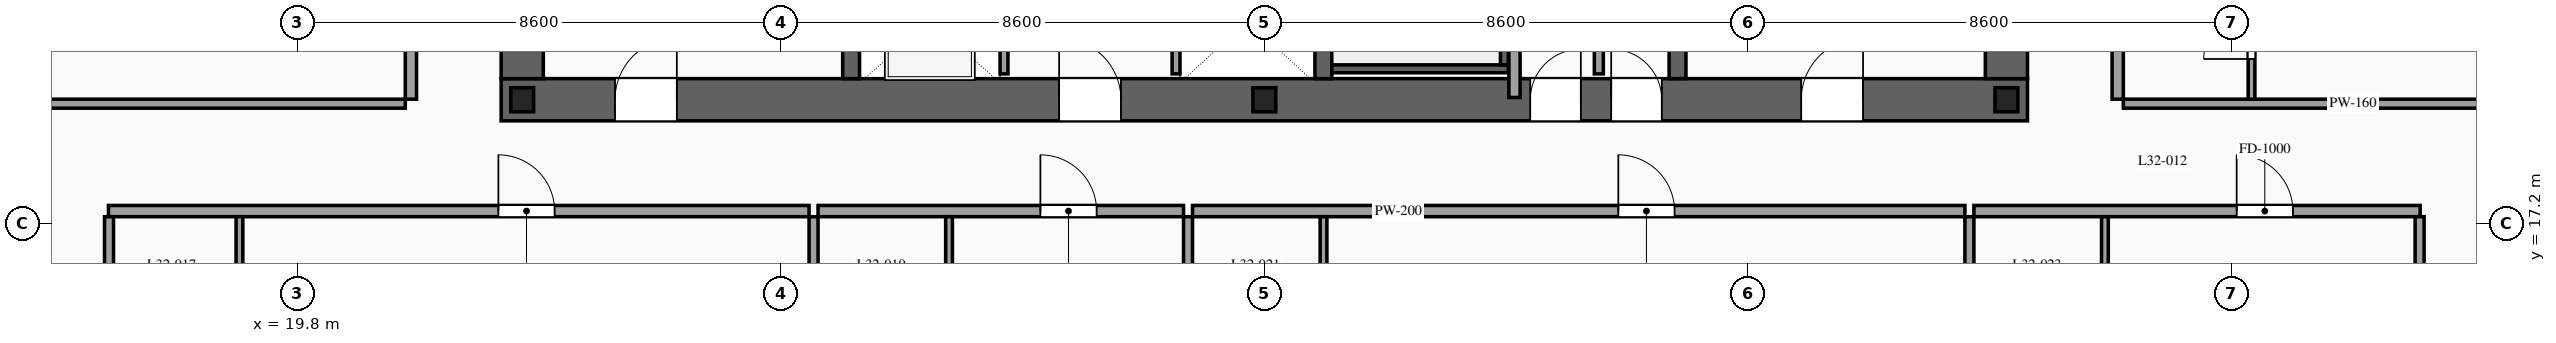
"""IFC4 building model, lengths in metres.
Left out: names, types, materials, properties, quantities, classifications, styles, units other than length and angle.
Written with IfcOpenShell. Run it as: python <this file> out.ifc"""

import sys

from ifc_helpers import new_model, si_unit, direction, frame, frame_2d, origin, origin_2d, place, context, subcontext, project, spatial, rectangle, i_section, extrude, source, transform, mapped, element, fill, save


model = new_model("IFC4")
c1 = context("Model", 3, precision=1e-05, world=origin(), true_north=direction((0.0, 1.0)))
c2 = subcontext(c1, "Body", "Model", "MODEL_VIEW")
j1 = project(units=[si_unit("LENGTHUNIT", "METRE"), si_unit("PLANEANGLEUNIT", "RADIAN")], contexts=[c1])
p1 = place(None, origin())
s1 = spatial("IfcSite", under=j1, at=p1, CompositionType="ELEMENT")
p2 = place(p1, origin())
s2 = spatial("IfcBuilding", under=s1, at=p2, CompositionType="ELEMENT")
p3 = place(p2, frame((0.0, 0.0, 122.6)))
s3 = spatial("IfcBuildingStorey", under=s2, at=p3, CompositionType="ELEMENT", Elevation=122.6)
p4 = place(p3, frame((23.425, 19.4, 0.0), z_axis=(0.0, 0.0, 1.0), x_axis=(1.0, 0.0, 0.0)))
e1 = element("IfcWall", 1, at=p4, inside=s3, PredefinedType="SHEAR", context=c2, shape_type="SweptSolid", body=[
    extrude(rectangle(XDim=27.15, YDim=0.75, at=frame_2d((13.575, 0.0))), origin(), (0.0, 0.0, 1.0), 3.6),
])
p5 = place(p4, frame((2.025, 0.0, 0.0)))
e2 = element("IfcOpeningElement", 2, at=p5, cuts=e1, PredefinedType="OPENING", context=c2, shape_type="SweptSolid", body=[
    extrude(rectangle(XDim=1.1, YDim=2.2, at=frame_2d((0.55, 1.1))), frame((0.0, 0.39, 0.0), z_axis=(0.0, -1.0, 0.0), x_axis=(1.0, 0.0, 0.0)), (0.0, 0.0, 1.0), 0.78),
])
p6 = place(p4, frame((9.925, 0.0, 0.0)))
e3 = element("IfcOpeningElement", 3, at=p6, cuts=e1, PredefinedType="OPENING", context=c2, shape_type="SweptSolid", body=[
    extrude(rectangle(XDim=1.1, YDim=2.2, at=frame_2d((0.55, 1.1))), frame((0.0, 0.39, 0.0), z_axis=(0.0, -1.0, 0.0), x_axis=(1.0, 0.0, 0.0)), (0.0, 0.0, 1.0), 0.78),
])
p7 = place(p4, frame((23.125, 0.0, 0.0)))
e4 = element("IfcOpeningElement", 4, at=p7, cuts=e1, PredefinedType="OPENING", context=c2, shape_type="SweptSolid", body=[
    extrude(rectangle(XDim=1.1, YDim=2.2, at=frame_2d((0.55, 1.1))), frame((0.0, 0.39, 0.0), z_axis=(0.0, -1.0, 0.0), x_axis=(1.0, 0.0, 0.0)), (0.0, 0.0, 1.0), 0.78),
])
p8 = place(p4, frame((19.745, 0.0, 0.0)))
e5 = element("IfcOpeningElement", 5, at=p8, cuts=e1, PredefinedType="OPENING", context=c2, shape_type="SweptSolid", body=[
    extrude(rectangle(XDim=0.9, YDim=2.15, at=frame_2d((0.45, 1.075))), frame((0.0, 0.39, 0.0), z_axis=(0.0, -1.0, 0.0), x_axis=(1.0, 0.0, 0.0)), (0.0, 0.0, 1.0), 0.78),
])
p9 = place(p4, frame((18.305, 0.0, 0.0)))
e6 = element("IfcOpeningElement", 6, at=p9, cuts=e1, PredefinedType="OPENING", context=c2, shape_type="SweptSolid", body=[
    extrude(rectangle(XDim=0.9, YDim=2.15, at=frame_2d((0.45, 1.075))), frame((0.0, 0.39, 0.0), z_axis=(0.0, -1.0, 0.0), x_axis=(1.0, 0.0, 0.0)), (0.0, 0.0, 1.0), 0.78),
])
m1 = source(origin(), c2, "Body", "SweptSolid", [
    extrude(rectangle(XDim=12.05, YDim=0.75, at=frame_2d((6.025, 0.0))), origin(), (0.0, 0.0, 1.0), 3.6),
])
for number, where, z_axis, x_axis in (
    (7, (23.8, 19.775, 0.0), (0.0, 0.0, 1.0), (0.0, 1.0, 0.0)),
    (8, (50.2, 19.775, 0.0), (0.0, 0.0, 1.0), (0.0, 1.0, 0.0)),
):
    element("IfcWall", number, at=place(p3, frame(where, z_axis=z_axis, x_axis=x_axis)), inside=s3, PredefinedType="SHEAR", context=c2, shape_type="MappedRepresentation", body=[
        mapped(m1, transform((0.0, 0.0, 0.0), scale=1.0)),
    ])
m2 = source(origin(), c2, "Body", "SweptSolid", [
    extrude(rectangle(XDim=12.05, YDim=0.3, at=frame_2d((6.025, 0.0))), origin(), (0.0, 0.0, 1.0), 3.6),
])
for number, where, z_axis, x_axis in (
    (9, (29.65, 19.775, 0.0), (0.0, 0.0, 1.0), (0.0, 1.0, 0.0)),
    (10, (38.05, 19.775, 0.0), (0.0, 0.0, 1.0), (0.0, 1.0, 0.0)),
    (11, (44.35, 19.775, 0.0), (0.0, 0.0, 1.0), (0.0, 1.0, 0.0)),
):
    element("IfcWall", number, at=place(p3, frame(where, z_axis=z_axis, x_axis=x_axis)), inside=s3, PredefinedType="SOLIDWALL", context=c2, shape_type="MappedRepresentation", body=[
        mapped(m2, transform((0.0, 0.0, 0.0), scale=1.0)),
    ])
m3 = source(origin(), c2, "Body", "SweptSolid", [
    extrude(i_section(OverallWidth=0.407, OverallDepth=0.428, WebThickness=0.02, FlangeThickness=0.035, at=origin_2d()), origin(), (0.0, 0.0, 1.0), 3.6),
])
for number, where, z_axis, x_axis in (
    (12, (23.8, 19.4, 0.0), (0.0, 0.0, 1.0), (1.0, 0.0, 0.0)),
    (13, (37.0, 19.4, 0.0), (0.0, 0.0, 1.0), (1.0, 0.0, 0.0)),
    (14, (50.2, 19.4, 0.0), (0.0, 0.0, 1.0), (1.0, 0.0, 0.0)),
):
    element("IfcColumn", number, at=place(p3, frame(where, z_axis=z_axis, x_axis=x_axis)), inside=s3, PredefinedType="COLUMN", context=c2, shape_type="MappedRepresentation", body=[
        mapped(m3, transform((0.0, 0.0, 0.0), scale=1.0)),
    ])
p10 = place(p3, frame((32.37, 19.86, 0.0), z_axis=(0.0, 0.0, 1.0), x_axis=(0.0, 1.0, 0.0)))
e15 = element("IfcWall", 15, at=p10, inside=s3, PredefinedType="SOLIDWALL", context=c2, shape_type="SweptSolid", body=[
    extrude(rectangle(XDim=2.04, YDim=0.14, at=frame_2d((1.02, 0.0))), origin(), (0.0, 0.0, 1.0), 3.38),
])
p11 = place(p10, frame((0.47, 0.0, 0.0)))
e16 = element("IfcOpeningElement", 16, at=p11, cuts=e15, PredefinedType="OPENING", context=c2, shape_type="SweptSolid", body=[
    extrude(rectangle(XDim=1.1, YDim=2.2, at=frame_2d((0.55, 1.1))), frame((0.0, 0.085, 0.0), z_axis=(0.0, -1.0, 0.0), x_axis=(1.0, 0.0, 0.0)), (0.0, 0.0, 1.0), 0.17),
])
m4 = source(origin(), c2, "Body", "SweptSolid", [
    extrude(rectangle(XDim=2.04, YDim=0.14, at=frame_2d((1.02, 0.0))), origin(), (0.0, 0.0, 1.0), 3.38),
])
p12 = place(p3, frame((35.43, 19.86, 0.0), z_axis=(0.0, 0.0, 1.0), x_axis=(0.0, 1.0, 0.0)))
e17 = element("IfcWall", 17, at=p12, inside=s3, PredefinedType="SOLIDWALL", context=c2, shape_type="MappedRepresentation", body=[
    mapped(m4, transform((0.0, 0.0, 0.0), scale=1.0)),
])
m5 = source(origin(), c2, "Body", "SweptSolid", [
    extrude(rectangle(XDim=3.14, YDim=0.14, at=frame_2d((1.57, 0.0))), origin(), (0.0, 0.0, 1.0), 3.38),
])
p13 = place(p3, frame((38.2, 19.95, 0.0), z_axis=(0.0, 0.0, 1.0), x_axis=(1.0, 0.0, 0.0)))
e18 = element("IfcWall", 18, at=p13, inside=s3, PredefinedType="SOLIDWALL", context=c2, shape_type="MappedRepresentation", body=[
    mapped(m5, transform((0.0, 0.0, 0.0), scale=1.0)),
])
m6 = source(origin(), c2, "Body", "SweptSolid", [
    extrude(rectangle(XDim=8.94, YDim=0.14, at=frame_2d((4.47, 0.0))), origin(), (0.0, 0.0, 1.0), 3.38),
])
p14 = place(p3, frame((41.27, 20.02, 0.0), z_axis=(0.0, 0.0, 1.0), x_axis=(0.0, 1.0, 0.0)))
e19 = element("IfcWall", 19, at=p14, inside=s3, PredefinedType="SOLIDWALL", context=c2, shape_type="MappedRepresentation", body=[
    mapped(m6, transform((0.0, 0.0, 0.0), scale=1.0)),
])
m7 = source(origin(), c2, "Body", "SweptSolid", [
    extrude(rectangle(XDim=1.34, YDim=0.16, at=frame_2d((0.67, 0.0))), origin(), (0.0, 0.0, 1.0), 3.38),
])
p15 = place(p3, frame((42.95, 19.86, 0.0), z_axis=(0.0, 0.0, 1.0), x_axis=(0.0, 1.0, 0.0)))
e20 = element("IfcWall", 20, at=p15, inside=s3, PredefinedType="PARTITIONING", context=c2, shape_type="MappedRepresentation", body=[
    mapped(m7, transform((0.0, 0.0, 0.0), scale=1.0)),
])
m8 = source(origin(), c2, "Body", "SweptSolid", [
    extrude(rectangle(XDim=12.72, YDim=0.2, at=frame_2d((6.36, 0.0))), origin(), (0.0, 0.0, 1.0), 3.38),
])
p16 = place(p3, frame((41.45, 19.44, 0.0), z_axis=(0.0, 0.0, 1.0), x_axis=(0.0, 1.0, 0.0)))
e21 = element("IfcWall", 21, at=p16, inside=s3, PredefinedType="PARTITIONING", context=c2, shape_type="MappedRepresentation", body=[
    mapped(m8, transform((0.0, 0.0, 0.0), scale=1.0)),
])
p17 = place(p3, frame((16.44, 17.42, 0.0), z_axis=(0.0, 0.0, 1.0), x_axis=(1.0, 0.0, 0.0)))
e22 = element("IfcWall", 22, at=p17, inside=s3, PredefinedType="PARTITIONING", context=c2, shape_type="SweptSolid", body=[
    extrude(rectangle(XDim=12.462, YDim=0.2, at=frame_2d((6.231, 0.0))), origin(), (0.0, 0.0, 1.0), 3.38),
])
p18 = place(p17, frame((6.936, 0.0, 0.0)))
e23 = element("IfcOpeningElement", 23, at=p18, cuts=e22, PredefinedType="OPENING", context=c2, shape_type="SweptSolid", body=[
    extrude(rectangle(XDim=1.0, YDim=2.2, at=frame_2d((0.5, 1.1))), frame((0.0, 0.115, 0.0), z_axis=(0.0, -1.0, 0.0), x_axis=(1.0, 0.0, 0.0)), (0.0, 0.0, 1.0), 0.23),
])
m9 = source(origin(), c2, "Body", "SweptSolid", [
    extrude(rectangle(XDim=14.97, YDim=0.16, at=frame_2d((7.485, 0.0))), origin(), (0.0, 0.0, 1.0), 3.38),
])
p19 = place(p3, frame((28.982, 2.35, 0.0), z_axis=(0.0, 0.0, 1.0), x_axis=(0.0, 1.0, 0.0)))
e24 = element("IfcWall", 24, at=p19, inside=s3, PredefinedType="PARTITIONING", context=c2, shape_type="MappedRepresentation", body=[
    mapped(m9, transform((0.0, 0.0, 0.0), scale=1.0)),
])
m10 = source(origin(), c2, "Body", "SweptSolid", [
    extrude(rectangle(XDim=2.42, YDim=0.12, at=frame_2d((1.21, 0.0))), origin(), (0.0, 0.0, 1.0), 3.38),
])
p20 = place(p3, frame((18.77, 14.9, 0.0), z_axis=(0.0, 0.0, 1.0), x_axis=(0.0, 1.0, 0.0)))
e25 = element("IfcWall", 25, at=p20, inside=s3, PredefinedType="PARTITIONING", context=c2, shape_type="MappedRepresentation", body=[
    mapped(m10, transform((0.0, 0.0, 0.0), scale=1.0)),
])
p21 = place(p3, frame((29.062, 17.42, 0.0), z_axis=(0.0, 0.0, 1.0), x_axis=(1.0, 0.0, 0.0)))
e26 = element("IfcWall", 26, at=p21, inside=s3, PredefinedType="PARTITIONING", context=c2, shape_type="SweptSolid", body=[
    extrude(rectangle(XDim=6.501, YDim=0.2, at=frame_2d((3.25, 0.0))), origin(), (0.0, 0.0, 1.0), 3.38),
])
p22 = place(p21, frame((3.955, 0.0, 0.0)))
e27 = element("IfcOpeningElement", 27, at=p22, cuts=e26, PredefinedType="OPENING", context=c2, shape_type="SweptSolid", body=[
    extrude(rectangle(XDim=1.0, YDim=2.2, at=frame_2d((0.5, 1.1))), frame((0.0, 0.115, 0.0), z_axis=(0.0, -1.0, 0.0), x_axis=(1.0, 0.0, 0.0)), (0.0, 0.0, 1.0), 0.23),
])
p23 = place(p3, frame((35.643, 2.35, 0.0), z_axis=(0.0, 0.0, 1.0), x_axis=(0.0, 1.0, 0.0)))
e28 = element("IfcWall", 28, at=p23, inside=s3, PredefinedType="PARTITIONING", context=c2, shape_type="MappedRepresentation", body=[
    mapped(m9, transform((0.0, 0.0, 0.0), scale=1.0)),
])
p24 = place(p3, frame((31.392, 14.9, 0.0), z_axis=(0.0, 0.0, 1.0), x_axis=(0.0, 1.0, 0.0)))
e29 = element("IfcWall", 29, at=p24, inside=s3, PredefinedType="PARTITIONING", context=c2, shape_type="MappedRepresentation", body=[
    mapped(m10, transform((0.0, 0.0, 0.0), scale=1.0)),
])
p25 = place(p3, frame((35.723, 17.42, 0.0), z_axis=(0.0, 0.0, 1.0), x_axis=(1.0, 0.0, 0.0)))
e30 = element("IfcWall", 30, at=p25, inside=s3, PredefinedType="PARTITIONING", context=c2, shape_type="SweptSolid", body=[
    extrude(rectangle(XDim=13.739, YDim=0.2, at=frame_2d((6.87, 0.0))), origin(), (0.0, 0.0, 1.0), 3.38),
])
p26 = place(p25, frame((7.574, 0.0, 0.0)))
e31 = element("IfcOpeningElement", 31, at=p26, cuts=e30, PredefinedType="OPENING", context=c2, shape_type="SweptSolid", body=[
    extrude(rectangle(XDim=1.0, YDim=2.2, at=frame_2d((0.5, 1.1))), frame((0.0, 0.115, 0.0), z_axis=(0.0, -1.0, 0.0), x_axis=(1.0, 0.0, 0.0)), (0.0, 0.0, 1.0), 0.23),
])
p27 = place(p3, frame((49.542, 2.35, 0.0), z_axis=(0.0, 0.0, 1.0), x_axis=(0.0, 1.0, 0.0)))
e32 = element("IfcWall", 32, at=p27, inside=s3, PredefinedType="PARTITIONING", context=c2, shape_type="MappedRepresentation", body=[
    mapped(m9, transform((0.0, 0.0, 0.0), scale=1.0)),
])
p28 = place(p3, frame((38.053, 14.9, 0.0), z_axis=(0.0, 0.0, 1.0), x_axis=(0.0, 1.0, 0.0)))
e33 = element("IfcWall", 33, at=p28, inside=s3, PredefinedType="PARTITIONING", context=c2, shape_type="MappedRepresentation", body=[
    mapped(m10, transform((0.0, 0.0, 0.0), scale=1.0)),
])
p29 = place(p3, frame((49.622, 17.42, 0.0), z_axis=(0.0, 0.0, 1.0), x_axis=(1.0, 0.0, 0.0)))
e34 = element("IfcWall", 34, at=p29, inside=s3, PredefinedType="PARTITIONING", context=c2, shape_type="SweptSolid", body=[
    extrude(rectangle(XDim=7.938, YDim=0.2, at=frame_2d((3.969, 0.0))), origin(), (0.0, 0.0, 1.0), 3.38),
])
p30 = place(p29, frame((4.674, 0.0, 0.0)))
e35 = element("IfcOpeningElement", 35, at=p30, cuts=e34, PredefinedType="OPENING", context=c2, shape_type="SweptSolid", body=[
    extrude(rectangle(XDim=1.0, YDim=2.2, at=frame_2d((0.5, 1.1))), frame((0.0, 0.115, 0.0), z_axis=(0.0, -1.0, 0.0), x_axis=(1.0, 0.0, 0.0)), (0.0, 0.0, 1.0), 0.23),
])
m11 = source(origin(), c2, "Body", "SweptSolid", [
    extrude(rectangle(XDim=14.82, YDim=0.16, at=frame_2d((7.41, 0.0))), origin(), (0.0, 0.0, 1.0), 3.38),
])
for number, where, z_axis, x_axis in (
    (36, (16.45, 2.5, 0.0), (0.0, 0.0, 1.0), (0.0, 1.0, 0.0)),
    (37, (57.55, 2.5, 0.0), (0.0, 0.0, 1.0), (0.0, 1.0, 0.0)),
):
    element("IfcWall", number, at=place(p3, frame(where, z_axis=z_axis, x_axis=x_axis)), inside=s3, PredefinedType="PARTITIONING", context=c2, shape_type="MappedRepresentation", body=[
        mapped(m11, transform((0.0, 0.0, 0.0), scale=1.0)),
    ])
p31 = place(p3, frame((51.952, 14.9, 0.0), z_axis=(0.0, 0.0, 1.0), x_axis=(0.0, 1.0, 0.0)))
e38 = element("IfcWall", 38, at=p31, inside=s3, PredefinedType="PARTITIONING", context=c2, shape_type="MappedRepresentation", body=[
    mapped(m10, transform((0.0, 0.0, 0.0), scale=1.0)),
])
p32 = place(p3, frame((21.82, 19.41, 0.0), z_axis=(0.0, 0.0, 1.0), x_axis=(0.0, 1.0, 0.0)))
e39 = element("IfcWall", 39, at=p32, inside=s3, PredefinedType="PARTITIONING", context=c2, shape_type="SweptSolid", body=[
    extrude(rectangle(XDim=12.78, YDim=0.2, at=frame_2d((6.39, 0.0))), origin(), (0.0, 0.0, 1.0), 3.38),
])
p33 = place(p32, frame((5.89, 0.0, 0.0)))
e40 = element("IfcOpeningElement", 40, at=p33, cuts=e39, PredefinedType="OPENING", context=c2, shape_type="SweptSolid", body=[
    extrude(rectangle(XDim=1.0, YDim=2.2, at=frame_2d((0.5, 1.1))), frame((0.0, 0.115, 0.0), z_axis=(0.0, -1.0, 0.0), x_axis=(1.0, 0.0, 0.0)), (0.0, 0.0, 1.0), 0.23),
])
m12 = source(origin(), c2, "Body", "SweptSolid", [
    extrude(rectangle(XDim=8.17, YDim=0.16, at=frame_2d((4.085, 0.0))), origin(), (0.0, 0.0, 1.0), 2.875),
])
p34 = place(p3, frame((13.55, 19.33, 0.0), z_axis=(0.0, 0.0, 1.0), x_axis=(1.0, 0.0, 0.0)))
e41 = element("IfcWall", 41, at=p34, inside=s3, PredefinedType="PARTITIONING", context=c2, shape_type="MappedRepresentation", body=[
    mapped(m12, transform((0.0, 0.0, 0.0), scale=1.0)),
])
p35 = place(p3, frame((52.18, 19.41, 0.0), z_axis=(0.0, 0.0, 1.0), x_axis=(0.0, 1.0, 0.0)))
e42 = element("IfcWall", 42, at=p35, inside=s3, PredefinedType="PARTITIONING", context=c2, shape_type="SweptSolid", body=[
    extrude(rectangle(XDim=6.31, YDim=0.2, at=frame_2d((3.155, 0.0))), origin(), (0.0, 0.0, 1.0), 3.38),
])
p36 = place(p35, frame((3.835, 0.0, 0.0)))
e43 = element("IfcOpeningElement", 43, at=p36, cuts=e42, PredefinedType="OPENING", context=c2, shape_type="SweptSolid", body=[
    extrude(rectangle(XDim=1.0, YDim=2.2, at=frame_2d((0.5, 1.1))), frame((0.0, 0.115, 0.0), z_axis=(0.0, -1.0, 0.0), x_axis=(1.0, 0.0, 0.0)), (0.0, 0.0, 1.0), 0.23),
])
p37 = place(p3, frame((52.28, 19.33, 0.0), z_axis=(0.0, 0.0, 1.0), x_axis=(1.0, 0.0, 0.0)))
e44 = element("IfcWall", 44, at=p37, inside=s3, PredefinedType="PARTITIONING", context=c2, shape_type="MappedRepresentation", body=[
    mapped(m12, transform((0.0, 0.0, 0.0), scale=1.0)),
])
p38 = place(p3, frame((54.56, 19.41, 0.0), z_axis=(0.0, 0.0, 1.0), x_axis=(0.0, 1.0, 0.0)))
e45 = element("IfcWall", 45, at=p38, inside=s3, PredefinedType="PARTITIONING", context=c2, shape_type="SweptSolid", body=[
    extrude(rectangle(XDim=2.28, YDim=0.12, at=frame_2d((1.14, 0.0))), origin(), (0.0, 0.0, 1.0), 3.38),
])
p39 = place(p38, frame((0.715, 0.0, 0.0)))
e46 = element("IfcOpeningElement", 46, at=p39, cuts=e45, PredefinedType="OPENING", context=c2, shape_type="SweptSolid", body=[
    extrude(rectangle(XDim=0.85, YDim=2.1, at=frame_2d((0.425, 1.05))), frame((0.0, 0.075, 0.0), z_axis=(0.0, -1.0, 0.0), x_axis=(1.0, 0.0, 0.0)), (0.0, 0.0, 1.0), 0.15),
])
m13 = source(origin(), c2, "Body", "SweptSolid", [
    extrude(rectangle(XDim=1.1, YDim=2.2, at=frame_2d((0.55, 1.1))), frame((0.0, 0.025, 0.0), z_axis=(0.0, -1.0, 0.0), x_axis=(1.0, 0.0, 0.0)), (0.0, 0.0, 1.0), 0.05),
])
p40 = place(p5, origin())
e47 = element("IfcDoor", 47, at=p40, inside=s3, OperationType="SINGLE_SWING_RIGHT", PredefinedType="DOOR", context=c2, shape_type="MappedRepresentation", body=[
    mapped(m13, transform((0.0, 0.0, 0.0), scale=1.0)),
])
fill(e2, e47)
p41 = place(p6, origin())
e48 = element("IfcDoor", 48, at=p41, inside=s3, OperationType="SINGLE_SWING_LEFT", PredefinedType="DOOR", context=c2, shape_type="MappedRepresentation", body=[
    mapped(m13, transform((0.0, 0.0, 0.0), scale=1.0)),
])
fill(e3, e48)
p42 = place(p7, origin())
e49 = element("IfcDoor", 49, at=p42, inside=s3, OperationType="SINGLE_SWING_RIGHT", PredefinedType="DOOR", context=c2, shape_type="MappedRepresentation", body=[
    mapped(m13, transform((0.0, 0.0, 0.0), scale=1.0)),
])
fill(e4, e49)
m14 = source(origin(), c2, "Body", "SweptSolid", [
    extrude(rectangle(XDim=0.9, YDim=2.15, at=frame_2d((0.45, 1.075))), frame((0.0, 0.025, 0.0), z_axis=(0.0, -1.0, 0.0), x_axis=(1.0, 0.0, 0.0)), (0.0, 0.0, 1.0), 0.05),
])
p43 = place(p8, origin())
e50 = element("IfcDoor", 50, at=p43, inside=s3, OperationType="SINGLE_SWING_LEFT", PredefinedType="DOOR", context=c2, shape_type="MappedRepresentation", body=[
    mapped(m14, transform((0.0, 0.0, 0.0), scale=1.0)),
])
fill(e5, e50)
p44 = place(p9, origin())
e51 = element("IfcDoor", 51, at=p44, inside=s3, OperationType="SINGLE_SWING_RIGHT", PredefinedType="DOOR", context=c2, shape_type="MappedRepresentation", body=[
    mapped(m14, transform((0.0, 0.0, 0.0), scale=1.0)),
])
fill(e6, e51)
m15 = source(origin(), c2, "Body", "SweptSolid", [
    extrude(rectangle(XDim=1.0, YDim=2.2, at=frame_2d((0.5, 1.1))), frame((0.0, 0.025, 0.0), z_axis=(0.0, -1.0, 0.0), x_axis=(1.0, 0.0, 0.0)), (0.0, 0.0, 1.0), 0.05),
])
p45 = place(p18, origin())
e52 = element("IfcDoor", 52, at=p45, inside=s3, OperationType="SINGLE_SWING_LEFT", PredefinedType="DOOR", context=c2, shape_type="MappedRepresentation", body=[
    mapped(m15, transform((0.0, 0.0, 0.0), scale=1.0)),
])
fill(e23, e52)
p46 = place(p22, origin())
e53 = element("IfcDoor", 53, at=p46, inside=s3, OperationType="SINGLE_SWING_LEFT", PredefinedType="DOOR", context=c2, shape_type="MappedRepresentation", body=[
    mapped(m15, transform((0.0, 0.0, 0.0), scale=1.0)),
])
fill(e27, e53)
p47 = place(p26, origin())
e54 = element("IfcDoor", 54, at=p47, inside=s3, OperationType="SINGLE_SWING_LEFT", PredefinedType="DOOR", context=c2, shape_type="MappedRepresentation", body=[
    mapped(m15, transform((0.0, 0.0, 0.0), scale=1.0)),
])
fill(e31, e54)
p48 = place(p30, origin())
e55 = element("IfcDoor", 55, at=p48, inside=s3, OperationType="SINGLE_SWING_LEFT", PredefinedType="DOOR", context=c2, shape_type="MappedRepresentation", body=[
    mapped(m15, transform((0.0, 0.0, 0.0), scale=1.0)),
])
fill(e35, e55)
m16 = source(origin(), c2, "Body", "SweptSolid", [
    extrude(rectangle(XDim=0.85, YDim=2.1, at=frame_2d((0.425, 1.05))), frame((0.0, 0.025, 0.0), z_axis=(0.0, -1.0, 0.0), x_axis=(1.0, 0.0, 0.0)), (0.0, 0.0, 1.0), 0.05),
])
p49 = place(p39, origin())
e56 = element("IfcDoor", 56, at=p49, inside=s3, OperationType="SINGLE_SWING_LEFT", PredefinedType="DOOR", context=c2, shape_type="MappedRepresentation", body=[
    mapped(m16, transform((0.0, 0.0, 0.0), scale=1.0)),
])
fill(e46, e56)
save(model, sys.argv[1])
